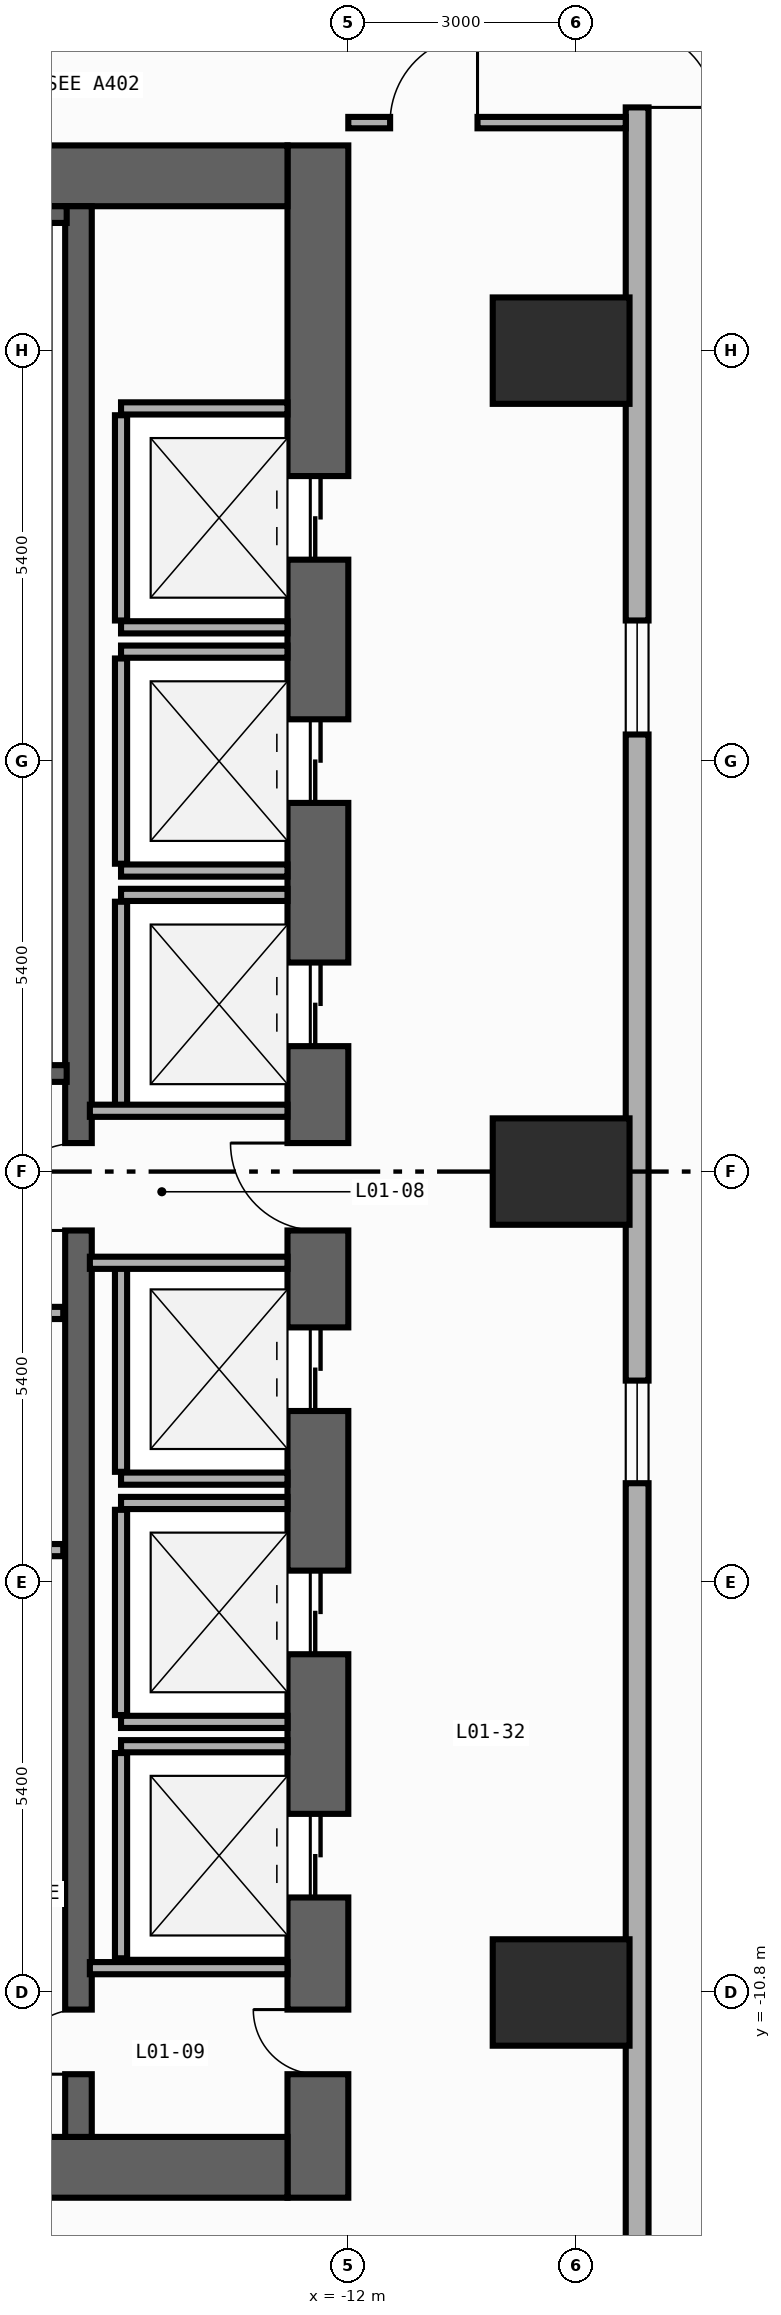
"""IFC4 building model, lengths in metres.
Left out: names, types, materials, properties, quantities, classifications, styles, units other than length and angle.
Written with IfcOpenShell. Run it as: python <this file> out.ifc"""

import sys

from ifc_helpers import new_model, si_unit, direction, frame, frame_2d, origin, origin_2d, place, context, subcontext, project, spatial, rectangle, extrude, element, fill, save


model = new_model("IFC4")
c1 = context("Model", 3, precision=1e-05, world=origin(), true_north=direction((0.0, 1.0)))
c2 = subcontext(c1, "Body", "Model", "MODEL_VIEW")
j1 = project(units=[si_unit("LENGTHUNIT", "METRE"), si_unit("PLANEANGLEUNIT", "RADIAN")], contexts=[c1])
p1 = place(None, origin())
s1 = spatial("IfcSite", under=j1, at=p1, CompositionType="ELEMENT")
p2 = place(p1, origin())
s2 = spatial("IfcBuilding", under=s1, at=p2, CompositionType="ELEMENT")
p3 = place(p2, origin())
s3 = spatial("IfcBuildingStorey", under=s2, at=p3, CompositionType="ELEMENT", Elevation=0.0)
p4 = place(p3, frame((-12.4, -13.5, 0.0), z_axis=(0.0, 0.0, 1.0), x_axis=(0.0, 1.0, 0.0)))
e1 = element("IfcWall", 1, at=p4, inside=s3, PredefinedType="SHEAR", context=c2, shape_type="SweptSolid", body=[
    extrude(rectangle(XDim=27.0, YDim=0.8, at=frame_2d((13.5, 0.0))), origin(), (0.0, 0.0, 1.0), 5.7),
])
p5 = place(p4, frame((21.55, 0.0, 0.0)))
e2 = element("IfcOpeningElement", 2, at=p5, cuts=e1, PredefinedType="OPENING", context=c2, shape_type="SweptSolid", body=[
    extrude(rectangle(XDim=1.1, YDim=2.2, at=frame_2d((0.55, 1.1))), frame((0.0, 0.41, 0.0), z_axis=(0.0, -1.0, 0.0), x_axis=(1.0, 0.0, 0.0)), (0.0, 0.0, 1.0), 0.82),
])
p6 = place(p4, frame((18.35, 0.0, 0.0)))
e3 = element("IfcOpeningElement", 3, at=p6, cuts=e1, PredefinedType="OPENING", context=c2, shape_type="SweptSolid", body=[
    extrude(rectangle(XDim=1.1, YDim=2.2, at=frame_2d((0.55, 1.1))), frame((0.0, 0.41, 0.0), z_axis=(0.0, -1.0, 0.0), x_axis=(1.0, 0.0, 0.0)), (0.0, 0.0, 1.0), 0.82),
])
p7 = place(p4, frame((15.15, 0.0, 0.0)))
e4 = element("IfcOpeningElement", 4, at=p7, cuts=e1, PredefinedType="OPENING", context=c2, shape_type="SweptSolid", body=[
    extrude(rectangle(XDim=1.1, YDim=2.2, at=frame_2d((0.55, 1.1))), frame((0.0, 0.41, 0.0), z_axis=(0.0, -1.0, 0.0), x_axis=(1.0, 0.0, 0.0)), (0.0, 0.0, 1.0), 0.82),
])
p8 = place(p4, frame((10.35, 0.0, 0.0)))
e5 = element("IfcOpeningElement", 5, at=p8, cuts=e1, PredefinedType="OPENING", context=c2, shape_type="SweptSolid", body=[
    extrude(rectangle(XDim=1.1, YDim=2.2, at=frame_2d((0.55, 1.1))), frame((0.0, 0.41, 0.0), z_axis=(0.0, -1.0, 0.0), x_axis=(1.0, 0.0, 0.0)), (0.0, 0.0, 1.0), 0.82),
])
p9 = place(p4, frame((7.15, 0.0, 0.0)))
e6 = element("IfcOpeningElement", 6, at=p9, cuts=e1, PredefinedType="OPENING", context=c2, shape_type="SweptSolid", body=[
    extrude(rectangle(XDim=1.1, YDim=2.2, at=frame_2d((0.55, 1.1))), frame((0.0, 0.41, 0.0), z_axis=(0.0, -1.0, 0.0), x_axis=(1.0, 0.0, 0.0)), (0.0, 0.0, 1.0), 0.82),
])
p10 = place(p4, frame((3.95, 0.0, 0.0)))
e7 = element("IfcOpeningElement", 7, at=p10, cuts=e1, PredefinedType="OPENING", context=c2, shape_type="SweptSolid", body=[
    extrude(rectangle(XDim=1.1, YDim=2.2, at=frame_2d((0.55, 1.1))), frame((0.0, 0.41, 0.0), z_axis=(0.0, -1.0, 0.0), x_axis=(1.0, 0.0, 0.0)), (0.0, 0.0, 1.0), 0.82),
])
p11 = place(p4, frame((12.725, 0.0, 0.0)))
e8 = element("IfcOpeningElement", 8, at=p11, cuts=e1, PredefinedType="OPENING", context=c2, shape_type="SweptSolid", body=[
    extrude(rectangle(XDim=1.15, YDim=2.2, at=frame_2d((0.575, 1.1))), frame((0.0, 0.41, 0.0), z_axis=(0.0, -1.0, 0.0), x_axis=(1.0, 0.0, 0.0)), (0.0, 0.0, 1.0), 0.82),
])
p12 = place(p4, frame((1.625, 0.0, 0.0)))
e9 = element("IfcOpeningElement", 9, at=p12, cuts=e1, PredefinedType="OPENING", context=c2, shape_type="SweptSolid", body=[
    extrude(rectangle(XDim=0.85, YDim=2.1, at=frame_2d((0.425, 1.05))), frame((0.0, 0.41, 0.0), z_axis=(0.0, -1.0, 0.0), x_axis=(1.0, 0.0, 0.0)), (0.0, 0.0, 1.0), 0.82),
])
for number, where, z_axis, x_axis in (
    (10, (-19.6, -13.1, 0.0), (0.0, 0.0, 1.0), (1.0, 0.0, 0.0)),
    (11, (-19.6, 13.1, 0.0), (0.0, 0.0, 1.0), (1.0, 0.0, 0.0)),
):
    element("IfcWall", number, at=place(p3, frame(where, z_axis=z_axis, x_axis=x_axis)), inside=s3, PredefinedType="SHEAR", context=c2, shape_type="SweptSolid", body=[
        extrude(rectangle(XDim=6.8, YDim=0.8, at=frame_2d((3.4, 0.0))), origin(), (0.0, 0.0, 1.0), 5.7),
    ])
p13 = place(p3, frame((-15.55, -12.7, 0.0), z_axis=(0.0, 0.0, 1.0), x_axis=(0.0, 1.0, 0.0)))
e12 = element("IfcWall", 12, at=p13, inside=s3, PredefinedType="SHEAR", context=c2, shape_type="SweptSolid", body=[
    extrude(rectangle(XDim=25.4, YDim=0.35, at=frame_2d((12.7, 0.0))), origin(), (0.0, 0.0, 1.0), 5.7),
])
p14 = place(p13, frame((11.925, 0.0, 0.0)))
e13 = element("IfcOpeningElement", 13, at=p14, cuts=e12, PredefinedType="OPENING", context=c2, shape_type="SweptSolid", body=[
    extrude(rectangle(XDim=1.15, YDim=2.2, at=frame_2d((0.575, 1.1))), frame((0.0, 0.185, 0.0), z_axis=(0.0, -1.0, 0.0), x_axis=(1.0, 0.0, 0.0)), (0.0, 0.0, 1.0), 0.37),
])
p15 = place(p13, frame((0.825, 0.0, 0.0)))
e14 = element("IfcOpeningElement", 14, at=p15, cuts=e12, PredefinedType="OPENING", context=c2, shape_type="SweptSolid", body=[
    extrude(rectangle(XDim=0.85, YDim=2.1, at=frame_2d((0.425, 1.05))), frame((0.0, 0.185, 0.0), z_axis=(0.0, -1.0, 0.0), x_axis=(1.0, 0.0, 0.0)), (0.0, 0.0, 1.0), 0.37),
])
p16 = place(p3, frame((-19.62, 12.59, 0.0), z_axis=(0.0, 0.0, 1.0), x_axis=(1.0, 0.0, 0.0)))
e15 = element("IfcWall", 15, at=p16, inside=s3, PredefinedType="SHEAR", context=c2, shape_type="SweptSolid", body=[
    extrude(rectangle(XDim=3.915, YDim=0.22, at=frame_2d((1.958, 0.0))), origin(), (0.0, 0.0, 1.0), 5.7),
])
p17 = place(p3, frame((-19.62, 1.29, 0.0), z_axis=(0.0, 0.0, 1.0), x_axis=(1.0, 0.0, 0.0)))
e16 = element("IfcWall", 16, at=p17, inside=s3, PredefinedType="SHEAR", context=c2, shape_type="SweptSolid", body=[
    extrude(rectangle(XDim=3.915, YDim=0.22, at=frame_2d((1.958, 0.0))), origin(), (0.0, 0.0, 1.0), 5.7),
])
p18 = place(p17, frame((1.08, 0.0, 0.0)))
e17 = element("IfcOpeningElement", 17, at=p18, cuts=e16, PredefinedType="OPENING", context=c2, shape_type="SweptSolid", body=[
    extrude(rectangle(XDim=1.1, YDim=2.2, at=frame_2d((0.55, 1.1))), frame((0.0, 0.12, 0.0), z_axis=(0.0, -1.0, 0.0), x_axis=(1.0, 0.0, 0.0)), (0.0, 0.0, 1.0), 0.24),
])
for number, where, z_axis, x_axis in (
    (18, (-9.2, -10.8, 0.0), (0.0, 0.0, 1.0), (1.0, 0.0, 0.0)),
    (19, (-9.2, 0.0, 0.0), (0.0, 0.0, 1.0), (1.0, 0.0, 0.0)),
    (20, (-9.2, 10.8, 0.0), (0.0, 0.0, 1.0), (1.0, 0.0, 0.0)),
):
    element("IfcColumn", number, at=place(p3, frame(where, z_axis=z_axis, x_axis=x_axis)), inside=s3, PredefinedType="COLUMN", context=c2, shape_type="SweptSolid", body=[
        extrude(rectangle(XDim=1.8, YDim=1.4, at=origin_2d()), origin(), (0.0, 0.0, 1.0), 6.0),
    ])
p19 = place(p3, frame((-8.2, 27.25, 0.0), z_axis=(0.0, 0.0, 1.0), x_axis=(0.0, -1.0, 0.0)))
e21 = element("IfcWall", 21, at=p19, inside=s3, PredefinedType="STANDARD", context=c2, shape_type="SweptSolid", body=[
    extrude(rectangle(XDim=54.5, YDim=0.3, at=frame_2d((27.25, 0.0))), origin(), (0.0, 0.0, 1.0), 5.7),
])
p20 = place(p19, frame((11.25, 0.0, 0.0)))
e22 = element("IfcOpeningElement", 22, at=p20, cuts=e21, PredefinedType="OPENING", context=c2, shape_type="SweptSolid", body=[
    extrude(rectangle(XDim=2.0, YDim=2.4, at=frame_2d((1.0, 1.2))), frame((0.0, 0.16, 0.0), z_axis=(0.0, -1.0, 0.0), x_axis=(1.0, 0.0, 0.0)), (0.0, 0.0, 1.0), 0.32),
])
p21 = place(p19, frame((20.0, 0.0, 0.85)))
e23 = element("IfcOpeningElement", 23, at=p21, cuts=e21, PredefinedType="OPENING", context=c2, shape_type="SweptSolid", body=[
    extrude(rectangle(XDim=1.5, YDim=1.8, at=frame_2d((0.75, 0.9))), frame((0.0, 0.16, 0.0), z_axis=(0.0, -1.0, 0.0), x_axis=(1.0, 0.0, 0.0)), (0.0, 0.0, 1.0), 0.32),
])
p22 = place(p19, frame((30.0, 0.0, 0.85)))
e24 = element("IfcOpeningElement", 24, at=p22, cuts=e21, PredefinedType="OPENING", context=c2, shape_type="SweptSolid", body=[
    extrude(rectangle(XDim=1.35, YDim=1.75, at=frame_2d((0.675, 0.875))), frame((0.0, 0.16, 0.0), z_axis=(0.0, -1.0, 0.0), x_axis=(1.0, 0.0, 0.0)), (0.0, 0.0, 1.0), 0.32),
])
for number, where, z_axis, x_axis in (
    (25, (-14.99, 7.16, 0.0), (0.0, 0.0, 1.0), (1.0, 0.0, 0.0)),
    (26, (-14.99, 10.04, 0.0), (0.0, 0.0, 1.0), (1.0, 0.0, 0.0)),
):
    element("IfcWall", number, at=place(p3, frame(where, z_axis=z_axis, x_axis=x_axis)), inside=s3, PredefinedType="STANDARD", context=c2, shape_type="SweptSolid", body=[
        extrude(rectangle(XDim=2.19, YDim=0.16, at=frame_2d((1.095, 0.0))), origin(), (0.0, 0.0, 1.0), 5.7),
    ])
p23 = place(p3, frame((-14.99, 7.25, 0.0), z_axis=(0.0, 0.0, 1.0), x_axis=(0.0, 1.0, 0.0)))
e27 = element("IfcWall", 27, at=p23, inside=s3, PredefinedType="STANDARD", context=c2, shape_type="SweptSolid", body=[
    extrude(rectangle(XDim=2.7, YDim=0.16, at=frame_2d((1.35, 0.0))), origin(), (0.0, 0.0, 1.0), 5.7),
])
for number, where, z_axis, x_axis in (
    (28, (-14.99, 3.96, 0.0), (0.0, 0.0, 1.0), (1.0, 0.0, 0.0)),
    (29, (-14.99, 6.84, 0.0), (0.0, 0.0, 1.0), (1.0, 0.0, 0.0)),
):
    element("IfcWall", number, at=place(p3, frame(where, z_axis=z_axis, x_axis=x_axis)), inside=s3, PredefinedType="STANDARD", context=c2, shape_type="SweptSolid", body=[
        extrude(rectangle(XDim=2.19, YDim=0.16, at=frame_2d((1.095, 0.0))), origin(), (0.0, 0.0, 1.0), 5.7),
    ])
p24 = place(p3, frame((-14.99, 4.05, 0.0), z_axis=(0.0, 0.0, 1.0), x_axis=(0.0, 1.0, 0.0)))
e30 = element("IfcWall", 30, at=p24, inside=s3, PredefinedType="STANDARD", context=c2, shape_type="SweptSolid", body=[
    extrude(rectangle(XDim=2.7, YDim=0.16, at=frame_2d((1.35, 0.0))), origin(), (0.0, 0.0, 1.0), 5.7),
])
p25 = place(p3, frame((-14.99, 3.64, 0.0), z_axis=(0.0, 0.0, 1.0), x_axis=(1.0, 0.0, 0.0)))
e31 = element("IfcWall", 31, at=p25, inside=s3, PredefinedType="STANDARD", context=c2, shape_type="SweptSolid", body=[
    extrude(rectangle(XDim=2.19, YDim=0.16, at=frame_2d((1.095, 0.0))), origin(), (0.0, 0.0, 1.0), 5.7),
])
p26 = place(p3, frame((-14.99, 0.85, 0.0), z_axis=(0.0, 0.0, 1.0), x_axis=(0.0, 1.0, 0.0)))
e32 = element("IfcWall", 32, at=p26, inside=s3, PredefinedType="STANDARD", context=c2, shape_type="SweptSolid", body=[
    extrude(rectangle(XDim=2.7, YDim=0.16, at=frame_2d((1.35, 0.0))), origin(), (0.0, 0.0, 1.0), 5.7),
])
p27 = place(p3, frame((-14.99, -4.04, 0.0), z_axis=(0.0, 0.0, 1.0), x_axis=(1.0, 0.0, 0.0)))
e33 = element("IfcWall", 33, at=p27, inside=s3, PredefinedType="STANDARD", context=c2, shape_type="SweptSolid", body=[
    extrude(rectangle(XDim=2.19, YDim=0.16, at=frame_2d((1.095, 0.0))), origin(), (0.0, 0.0, 1.0), 5.7),
])
p28 = place(p3, frame((-14.99, -3.95, 0.0), z_axis=(0.0, 0.0, 1.0), x_axis=(0.0, 1.0, 0.0)))
e34 = element("IfcWall", 34, at=p28, inside=s3, PredefinedType="STANDARD", context=c2, shape_type="SweptSolid", body=[
    extrude(rectangle(XDim=2.7, YDim=0.16, at=frame_2d((1.35, 0.0))), origin(), (0.0, 0.0, 1.0), 5.7),
])
for number, where, z_axis, x_axis in (
    (35, (-14.99, -7.24, 0.0), (0.0, 0.0, 1.0), (1.0, 0.0, 0.0)),
    (36, (-14.99, -4.36, 0.0), (0.0, 0.0, 1.0), (1.0, 0.0, 0.0)),
):
    element("IfcWall", number, at=place(p3, frame(where, z_axis=z_axis, x_axis=x_axis)), inside=s3, PredefinedType="STANDARD", context=c2, shape_type="SweptSolid", body=[
        extrude(rectangle(XDim=2.19, YDim=0.16, at=frame_2d((1.095, 0.0))), origin(), (0.0, 0.0, 1.0), 5.7),
    ])
p29 = place(p3, frame((-14.99, -7.15, 0.0), z_axis=(0.0, 0.0, 1.0), x_axis=(0.0, 1.0, 0.0)))
e37 = element("IfcWall", 37, at=p29, inside=s3, PredefinedType="STANDARD", context=c2, shape_type="SweptSolid", body=[
    extrude(rectangle(XDim=2.7, YDim=0.16, at=frame_2d((1.35, 0.0))), origin(), (0.0, 0.0, 1.0), 5.7),
])
p30 = place(p3, frame((-14.99, -7.56, 0.0), z_axis=(0.0, 0.0, 1.0), x_axis=(1.0, 0.0, 0.0)))
e38 = element("IfcWall", 38, at=p30, inside=s3, PredefinedType="STANDARD", context=c2, shape_type="SweptSolid", body=[
    extrude(rectangle(XDim=2.19, YDim=0.16, at=frame_2d((1.095, 0.0))), origin(), (0.0, 0.0, 1.0), 5.7),
])
p31 = place(p3, frame((-14.99, -10.35, 0.0), z_axis=(0.0, 0.0, 1.0), x_axis=(0.0, 1.0, 0.0)))
e39 = element("IfcWall", 39, at=p31, inside=s3, PredefinedType="STANDARD", context=c2, shape_type="SweptSolid", body=[
    extrude(rectangle(XDim=2.7, YDim=0.16, at=frame_2d((1.35, 0.0))), origin(), (0.0, 0.0, 1.0), 5.7),
])
p32 = place(p3, frame((-19.55, -1.86, 0.0), z_axis=(0.0, 0.0, 1.0), x_axis=(1.0, 0.0, 0.0)))
e40 = element("IfcWall", 40, at=p32, inside=s3, PredefinedType="STANDARD", context=c2, shape_type="SweptSolid", body=[
    extrude(rectangle(XDim=3.8, YDim=0.16, at=frame_2d((1.9, 0.0))), origin(), (0.0, 0.0, 1.0), 5.7),
])
p33 = place(p32, frame((1.18, 0.0, 0.0)))
e41 = element("IfcOpeningElement", 41, at=p33, cuts=e40, PredefinedType="OPENING", context=c2, shape_type="SweptSolid", body=[
    extrude(rectangle(XDim=1.15, YDim=2.2, at=frame_2d((0.575, 1.1))), frame((0.0, 0.09, 0.0), z_axis=(0.0, -1.0, 0.0), x_axis=(1.0, 0.0, 0.0)), (0.0, 0.0, 1.0), 0.18),
])
p34 = place(p3, frame((-19.55, -4.98, 0.0), z_axis=(0.0, 0.0, 1.0), x_axis=(1.0, 0.0, 0.0)))
e42 = element("IfcWall", 42, at=p34, inside=s3, PredefinedType="STANDARD", context=c2, shape_type="SweptSolid", body=[
    extrude(rectangle(XDim=3.8, YDim=0.16, at=frame_2d((1.9, 0.0))), origin(), (0.0, 0.0, 1.0), 5.7),
])
for number, where, z_axis, x_axis in (
    (43, (-15.4, 0.8, 0.0), (0.0, 0.0, 1.0), (1.0, 0.0, 0.0)),
    (44, (-15.4, -1.2, 0.0), (0.0, 0.0, 1.0), (1.0, 0.0, 0.0)),
    (45, (-15.4, -10.48, 0.0), (0.0, 0.0, 1.0), (1.0, 0.0, 0.0)),
):
    element("IfcWall", number, at=place(p3, frame(where, z_axis=z_axis, x_axis=x_axis)), inside=s3, PredefinedType="STANDARD", context=c2, shape_type="SweptSolid", body=[
        extrude(rectangle(XDim=2.6, YDim=0.16, at=frame_2d((1.3, 0.0))), origin(), (0.0, 0.0, 1.0), 5.7),
    ])
p35 = place(p3, frame((-12.0, 13.8, 0.0), z_axis=(0.0, 0.0, 1.0), x_axis=(1.0, 0.0, 0.0)))
e46 = element("IfcWall", 46, at=p35, inside=s3, PredefinedType="PARTITIONING", context=c2, shape_type="SweptSolid", body=[
    extrude(rectangle(XDim=3.65, YDim=0.15, at=frame_2d((1.825, 0.0))), origin(), (0.0, 0.0, 1.0), 5.7),
])
p36 = place(p35, frame((0.55, 0.0, 0.0)))
e47 = element("IfcOpeningElement", 47, at=p36, cuts=e46, PredefinedType="OPENING", context=c2, shape_type="SweptSolid", body=[
    extrude(rectangle(XDim=1.15, YDim=2.2, at=frame_2d((0.575, 1.1))), frame((0.0, 0.085, 0.0), z_axis=(0.0, -1.0, 0.0), x_axis=(1.0, 0.0, 0.0)), (0.0, 0.0, 1.0), 0.17),
])
p37 = place(p20, origin())
e48 = element("IfcDoor", 48, at=p37, inside=s3, OperationType="DOUBLE_DOOR_SINGLE_SWING", PredefinedType="DOOR", context=c2, shape_type="SweptSolid", body=[
    extrude(rectangle(XDim=2.0, YDim=2.4, at=frame_2d((1.0, 1.2))), frame((0.0, 0.025, 0.0), z_axis=(0.0, -1.0, 0.0), x_axis=(1.0, 0.0, 0.0)), (0.0, 0.0, 1.0), 0.05),
])
fill(e22, e48)
p38 = place(p21, origin())
e49 = element("IfcWindow", 49, at=p38, inside=s3, PartitioningType="SINGLE_PANEL", PredefinedType="WINDOW", context=c2, shape_type="SweptSolid", body=[
    extrude(rectangle(XDim=1.5, YDim=1.8, at=frame_2d((0.75, 0.9))), frame((0.0, 0.03, 0.0), z_axis=(0.0, -1.0, 0.0), x_axis=(1.0, 0.0, 0.0)), (0.0, 0.0, 1.0), 0.06),
])
fill(e23, e49)
p39 = place(p22, origin())
e50 = element("IfcWindow", 50, at=p39, inside=s3, PartitioningType="SINGLE_PANEL", PredefinedType="WINDOW", context=c2, shape_type="SweptSolid", body=[
    extrude(rectangle(XDim=1.35, YDim=1.75, at=frame_2d((0.675, 0.875))), frame((0.0, 0.03, 0.0), z_axis=(0.0, -1.0, 0.0), x_axis=(1.0, 0.0, 0.0)), (0.0, 0.0, 1.0), 0.06),
])
fill(e24, e50)
p40 = place(p5, origin())
e51 = element("IfcDoor", 51, at=p40, inside=s3, OperationType="DOUBLE_DOOR_SLIDING", PredefinedType="DOOR", context=c2, shape_type="SweptSolid", body=[
    extrude(rectangle(XDim=1.1, YDim=2.2, at=frame_2d((0.55, 1.1))), frame((0.0, 0.025, 0.0), z_axis=(0.0, -1.0, 0.0), x_axis=(1.0, 0.0, 0.0)), (0.0, 0.0, 1.0), 0.05),
])
fill(e2, e51)
p41 = place(p6, origin())
e52 = element("IfcDoor", 52, at=p41, inside=s3, OperationType="DOUBLE_DOOR_SLIDING", PredefinedType="DOOR", context=c2, shape_type="SweptSolid", body=[
    extrude(rectangle(XDim=1.1, YDim=2.2, at=frame_2d((0.55, 1.1))), frame((0.0, 0.025, 0.0), z_axis=(0.0, -1.0, 0.0), x_axis=(1.0, 0.0, 0.0)), (0.0, 0.0, 1.0), 0.05),
])
fill(e3, e52)
p42 = place(p7, origin())
e53 = element("IfcDoor", 53, at=p42, inside=s3, OperationType="DOUBLE_DOOR_SLIDING", PredefinedType="DOOR", context=c2, shape_type="SweptSolid", body=[
    extrude(rectangle(XDim=1.1, YDim=2.2, at=frame_2d((0.55, 1.1))), frame((0.0, 0.025, 0.0), z_axis=(0.0, -1.0, 0.0), x_axis=(1.0, 0.0, 0.0)), (0.0, 0.0, 1.0), 0.05),
])
fill(e4, e53)
p43 = place(p8, origin())
e54 = element("IfcDoor", 54, at=p43, inside=s3, OperationType="DOUBLE_DOOR_SLIDING", PredefinedType="DOOR", context=c2, shape_type="SweptSolid", body=[
    extrude(rectangle(XDim=1.1, YDim=2.2, at=frame_2d((0.55, 1.1))), frame((0.0, 0.025, 0.0), z_axis=(0.0, -1.0, 0.0), x_axis=(1.0, 0.0, 0.0)), (0.0, 0.0, 1.0), 0.05),
])
fill(e5, e54)
p44 = place(p9, origin())
e55 = element("IfcDoor", 55, at=p44, inside=s3, OperationType="DOUBLE_DOOR_SLIDING", PredefinedType="DOOR", context=c2, shape_type="SweptSolid", body=[
    extrude(rectangle(XDim=1.1, YDim=2.2, at=frame_2d((0.55, 1.1))), frame((0.0, 0.025, 0.0), z_axis=(0.0, -1.0, 0.0), x_axis=(1.0, 0.0, 0.0)), (0.0, 0.0, 1.0), 0.05),
])
fill(e6, e55)
p45 = place(p10, origin())
e56 = element("IfcDoor", 56, at=p45, inside=s3, OperationType="DOUBLE_DOOR_SLIDING", PredefinedType="DOOR", context=c2, shape_type="SweptSolid", body=[
    extrude(rectangle(XDim=1.1, YDim=2.2, at=frame_2d((0.55, 1.1))), frame((0.0, 0.025, 0.0), z_axis=(0.0, -1.0, 0.0), x_axis=(1.0, 0.0, 0.0)), (0.0, 0.0, 1.0), 0.05),
])
fill(e7, e56)
p46 = place(p11, origin())
e57 = element("IfcDoor", 57, at=p46, inside=s3, OperationType="SINGLE_SWING_RIGHT", PredefinedType="DOOR", context=c2, shape_type="SweptSolid", body=[
    extrude(rectangle(XDim=1.15, YDim=2.2, at=frame_2d((0.575, 1.1))), frame((0.0, 0.025, 0.0), z_axis=(0.0, -1.0, 0.0), x_axis=(1.0, 0.0, 0.0)), (0.0, 0.0, 1.0), 0.05),
])
fill(e8, e57)
p47 = place(p14, origin())
e58 = element("IfcDoor", 58, at=p47, inside=s3, OperationType="SINGLE_SWING_LEFT", PredefinedType="DOOR", context=c2, shape_type="SweptSolid", body=[
    extrude(rectangle(XDim=1.15, YDim=2.2, at=frame_2d((0.575, 1.1))), frame((0.0, 0.025, 0.0), z_axis=(0.0, -1.0, 0.0), x_axis=(1.0, 0.0, 0.0)), (0.0, 0.0, 1.0), 0.05),
])
fill(e13, e58)
p48 = place(p12, origin())
e59 = element("IfcDoor", 59, at=p48, inside=s3, OperationType="SINGLE_SWING_RIGHT", PredefinedType="DOOR", context=c2, shape_type="SweptSolid", body=[
    extrude(rectangle(XDim=0.85, YDim=2.1, at=frame_2d((0.425, 1.05))), frame((0.0, 0.025, 0.0), z_axis=(0.0, -1.0, 0.0), x_axis=(1.0, 0.0, 0.0)), (0.0, 0.0, 1.0), 0.05),
])
fill(e9, e59)
p49 = place(p15, origin())
e60 = element("IfcDoor", 60, at=p49, inside=s3, OperationType="SINGLE_SWING_LEFT", PredefinedType="DOOR", context=c2, shape_type="SweptSolid", body=[
    extrude(rectangle(XDim=0.85, YDim=2.1, at=frame_2d((0.425, 1.05))), frame((0.0, 0.025, 0.0), z_axis=(0.0, -1.0, 0.0), x_axis=(1.0, 0.0, 0.0)), (0.0, 0.0, 1.0), 0.05),
])
fill(e14, e60)
p50 = place(p36, origin())
e61 = element("IfcDoor", 61, at=p50, inside=s3, OperationType="SINGLE_SWING_RIGHT", PredefinedType="DOOR", context=c2, shape_type="SweptSolid", body=[
    extrude(rectangle(XDim=1.15, YDim=2.2, at=frame_2d((0.575, 1.1))), frame((0.0, 0.025, 0.0), z_axis=(0.0, -1.0, 0.0), x_axis=(1.0, 0.0, 0.0)), (0.0, 0.0, 1.0), 0.05),
])
fill(e47, e61)
save(model, sys.argv[1])
